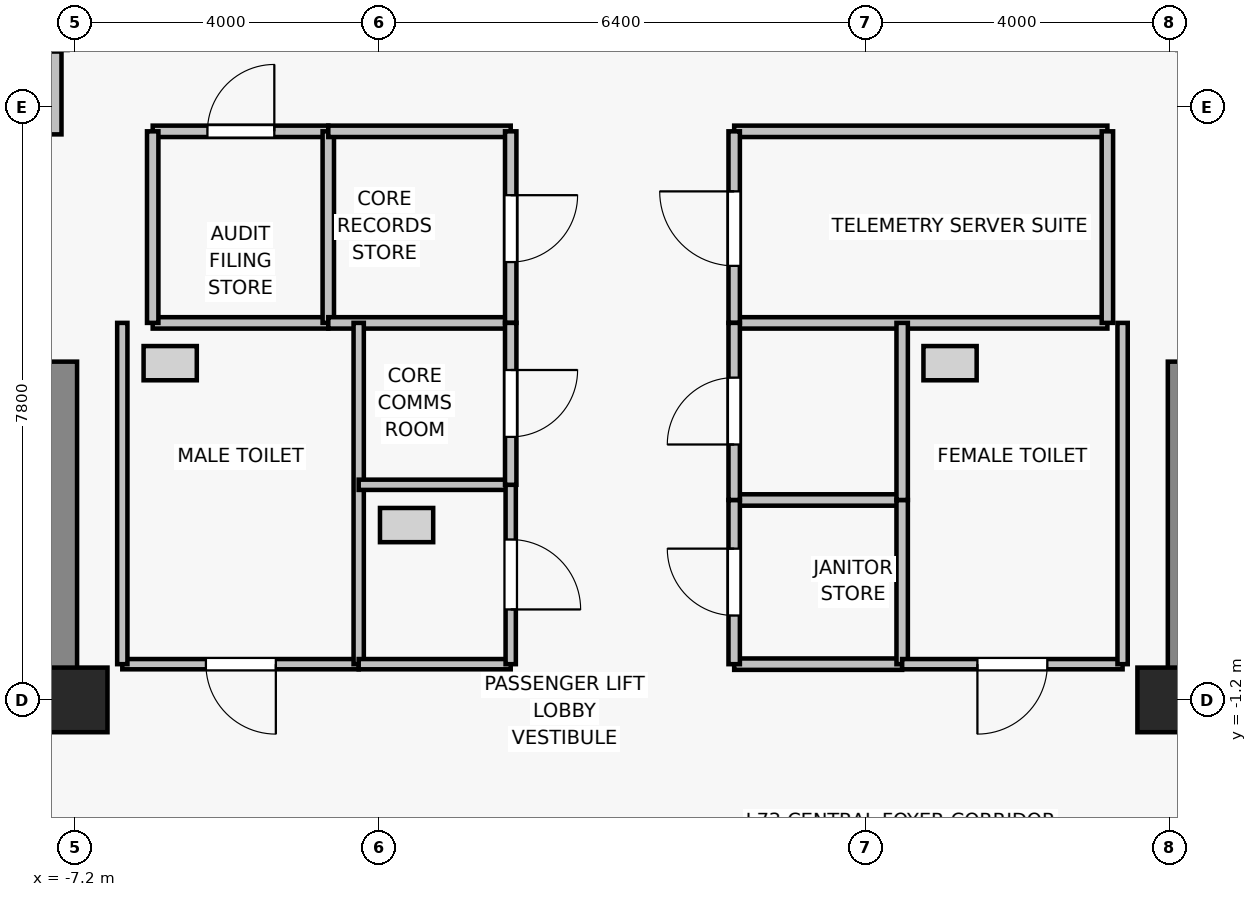
"""IFC4 building model, lengths in metres.
Left out: names, types, materials, properties, quantities, classifications, styles, units other than length and angle.
Written with IfcOpenShell. Run it as: python <this file> out.ifc"""

import sys

from ifc_helpers import new_model, si_unit, direction, frame, frame_2d, origin, origin_2d, place, context, subcontext, project, spatial, rectangle, extrude, source, transform, mapped, element, fill, save


model = new_model("IFC4")
c1 = context("Model", 3, precision=1e-05, world=origin(), true_north=direction((0.0, 1.0)))
c2 = subcontext(c1, "Body", "Model", "MODEL_VIEW")
j1 = project(units=[si_unit("LENGTHUNIT", "METRE"), si_unit("PLANEANGLEUNIT", "RADIAN")], contexts=[c1])
p1 = place(None, origin())
s1 = spatial("IfcSite", under=j1, at=p1, CompositionType="ELEMENT")
p2 = place(p1, origin())
s2 = spatial("IfcBuilding", under=s1, at=p2, CompositionType="ELEMENT")
p3 = place(p2, frame((0.0, 0.0, 258.4)))
s3 = spatial("IfcBuildingStorey", under=s2, at=p3, CompositionType="ELEMENT", Elevation=258.4)
for number, where, z_axis, x_axis in (
    (1, (-7.2, -1.2, 0.0), (0.0, 0.0, 1.0), (1.0, 0.0, 0.0)),
    (2, (7.2, -1.2, 0.0), (0.0, 0.0, 1.0), (1.0, 0.0, 0.0)),
):
    element("IfcColumn", number, at=place(p3, frame(where, z_axis=z_axis, x_axis=x_axis)), inside=s3, PredefinedType="COLUMN", context=c2, shape_type="SweptSolid", body=[
        extrude(rectangle(XDim=0.85, YDim=0.85, at=origin_2d()), origin(), (0.0, 0.0, 1.0), 3.3),
    ])
for number, where, z_axis, x_axis in (
    (3, (-7.4, -0.9, 0.0), (0.0, 0.0, 1.0), (0.0, 1.0, 0.0)),
    (4, (7.4, -0.9, 0.0), (0.0, 0.0, 1.0), (0.0, 1.0, 0.0)),
):
    element("IfcWall", number, at=place(p3, frame(where, z_axis=z_axis, x_axis=x_axis)), inside=s3, PredefinedType="SHEAR", context=c2, shape_type="SweptSolid", body=[
        extrude(rectangle(XDim=4.15, YDim=0.45, at=frame_2d((2.075, 0.0))), origin(), (0.0, 0.0, 1.0), 3.075),
    ])
p4 = place(p3, frame((-7.4, 7.35, 0.0), z_axis=(0.0, 0.0, 1.0), x_axis=(-1.0, 0.0, 0.0)))
e5 = element("IfcWall", 5, at=p4, inside=s3, PredefinedType="SOLIDWALL", context=c2, shape_type="SweptSolid", body=[
    extrude(rectangle(XDim=2.2, YDim=0.2, at=frame_2d((1.1, 0.0))), origin(), (0.0, 0.0, 1.0), 2.615),
])
p5 = place(p3, frame((-7.47, 7.33, 0.0), z_axis=(0.0, 0.0, 1.0), x_axis=(0.0, -1.0, 0.0)))
e6 = element("IfcWall", 6, at=p5, inside=s3, PredefinedType="PARTITIONING", context=c2, shape_type="SweptSolid", body=[
    extrude(rectangle(XDim=1.09, YDim=0.18, at=frame_2d((0.545, 0.0))), origin(), (0.0, 0.0, 1.0), 2.615),
])
p6 = place(p3, frame((-3.87, 3.76, 0.0), z_axis=(0.0, 0.0, 1.0), x_axis=(-1.0, 0.0, 0.0)))
e7 = element("IfcWall", 7, at=p6, inside=s3, PredefinedType="PARTITIONING", context=c2, shape_type="SweptSolid", body=[
    extrude(rectangle(XDim=2.31, YDim=0.15, at=frame_2d((1.155, 0.0))), origin(), (0.0, 0.0, 1.0), 3.075),
])
p7 = place(p3, frame((-6.18, 6.28, 0.0), z_axis=(0.0, 0.0, 1.0), x_axis=(1.0, 0.0, 0.0)))
e8 = element("IfcWall", 8, at=p7, inside=s3, PredefinedType="PARTITIONING", context=c2, shape_type="SweptSolid", body=[
    extrude(rectangle(XDim=2.31, YDim=0.15, at=frame_2d((1.155, 0.0))), origin(), (0.0, 0.0, 1.0), 3.075),
])
p8 = place(p7, frame((0.72, 0.0, 0.0)))
e9 = element("IfcOpeningElement", 9, at=p8, cuts=e8, PredefinedType="OPENING", context=c2, shape_type="SweptSolid", body=[
    extrude(rectangle(XDim=0.88, YDim=2.1, at=frame_2d((0.44, 1.05))), frame((0.0, 0.085, 0.0), z_axis=(0.0, -1.0, 0.0), x_axis=(1.0, 0.0, 0.0)), (0.0, 0.0, 1.0), 0.17),
])
for number, where, z_axis, x_axis in (
    (10, (-6.18, 3.76, 0.0), (0.0, 0.0, 1.0), (0.0, 1.0, 0.0)),
    (11, (-3.87, 6.28, 0.0), (0.0, 0.0, 1.0), (0.0, -1.0, 0.0)),
):
    element("IfcWall", number, at=place(p3, frame(where, z_axis=z_axis, x_axis=x_axis)), inside=s3, PredefinedType="PARTITIONING", context=c2, shape_type="SweptSolid", body=[
        extrude(rectangle(XDim=2.52, YDim=0.15, at=frame_2d((1.26, 0.0))), origin(), (0.0, 0.0, 1.0), 3.075),
    ])
for number, where, z_axis, x_axis in (
    (12, (-1.47, 3.76, 0.0), (0.0, 0.0, 1.0), (-1.0, 0.0, 0.0)),
    (13, (-3.87, 6.28, 0.0), (0.0, 0.0, 1.0), (1.0, 0.0, 0.0)),
):
    element("IfcWall", number, at=place(p3, frame(where, z_axis=z_axis, x_axis=x_axis)), inside=s3, PredefinedType="PARTITIONING", context=c2, shape_type="SweptSolid", body=[
        extrude(rectangle(XDim=2.4, YDim=0.15, at=frame_2d((1.2, 0.0))), origin(), (0.0, 0.0, 1.0), 3.075),
    ])
p9 = place(p3, frame((-1.47, 6.28, 0.0), z_axis=(0.0, 0.0, 1.0), x_axis=(0.0, -1.0, 0.0)))
e14 = element("IfcWall", 14, at=p9, inside=s3, PredefinedType="PARTITIONING", context=c2, shape_type="SweptSolid", body=[
    extrude(rectangle(XDim=2.52, YDim=0.15, at=frame_2d((1.26, 0.0))), origin(), (0.0, 0.0, 1.0), 3.075),
])
p10 = place(p9, frame((0.84, 0.0, 0.0)))
e15 = element("IfcOpeningElement", 15, at=p10, cuts=e14, PredefinedType="OPENING", context=c2, shape_type="SweptSolid", body=[
    extrude(rectangle(XDim=0.88, YDim=2.1, at=frame_2d((0.44, 1.05))), frame((0.0, 0.085, 0.0), z_axis=(0.0, -1.0, 0.0), x_axis=(1.0, 0.0, 0.0)), (0.0, 0.0, 1.0), 0.17),
])
for number, where, z_axis, x_axis in (
    (16, (6.38, 3.76, 0.0), (0.0, 0.0, 1.0), (-1.0, 0.0, 0.0)),
    (17, (1.47, 6.28, 0.0), (0.0, 0.0, 1.0), (1.0, 0.0, 0.0)),
):
    element("IfcWall", number, at=place(p3, frame(where, z_axis=z_axis, x_axis=x_axis)), inside=s3, PredefinedType="PARTITIONING", context=c2, shape_type="SweptSolid", body=[
        extrude(rectangle(XDim=4.91, YDim=0.15, at=frame_2d((2.455, 0.0))), origin(), (0.0, 0.0, 1.0), 3.075),
    ])
p11 = place(p3, frame((1.47, 3.76, 0.0), z_axis=(0.0, 0.0, 1.0), x_axis=(0.0, 1.0, 0.0)))
e18 = element("IfcWall", 18, at=p11, inside=s3, PredefinedType="PARTITIONING", context=c2, shape_type="SweptSolid", body=[
    extrude(rectangle(XDim=2.52, YDim=0.15, at=frame_2d((1.26, 0.0))), origin(), (0.0, 0.0, 1.0), 3.075),
])
p12 = place(p11, frame((0.75, 0.0, 0.0)))
e19 = element("IfcOpeningElement", 19, at=p12, cuts=e18, PredefinedType="OPENING", context=c2, shape_type="SweptSolid", body=[
    extrude(rectangle(XDim=0.98, YDim=2.15, at=frame_2d((0.49, 1.075))), frame((0.0, 0.085, 0.0), z_axis=(0.0, -1.0, 0.0), x_axis=(1.0, 0.0, 0.0)), (0.0, 0.0, 1.0), 0.17),
])
p13 = place(p3, frame((6.38, 6.28, 0.0), z_axis=(0.0, 0.0, 1.0), x_axis=(0.0, -1.0, 0.0)))
e20 = element("IfcWall", 20, at=p13, inside=s3, PredefinedType="PARTITIONING", context=c2, shape_type="SweptSolid", body=[
    extrude(rectangle(XDim=2.52, YDim=0.15, at=frame_2d((1.26, 0.0))), origin(), (0.0, 0.0, 1.0), 3.075),
])
p14 = place(p3, frame((-3.47, -0.73, 0.0), z_axis=(0.0, 0.0, 1.0), x_axis=(-1.0, 0.0, 0.0)))
e21 = element("IfcWall", 21, at=p14, inside=s3, PredefinedType="PARTITIONING", context=c2, shape_type="SweptSolid", body=[
    extrude(rectangle(XDim=3.11, YDim=0.135, at=frame_2d((1.555, 0.0))), origin(), (0.0, 0.0, 1.0), 3.075),
])
p15 = place(p14, frame((1.09, 0.0, 0.0)))
e22 = element("IfcOpeningElement", 22, at=p15, cuts=e21, PredefinedType="OPENING", context=c2, shape_type="SweptSolid", body=[
    extrude(rectangle(XDim=0.92, YDim=2.1, at=frame_2d((0.46, 1.05))), frame((0.0, 0.077, 0.0), z_axis=(0.0, -1.0, 0.0), x_axis=(1.0, 0.0, 0.0)), (0.0, 0.0, 1.0), 0.155),
])
for number, where, z_axis, x_axis in (
    (23, (-6.58, -0.73, 0.0), (0.0, 0.0, 1.0), (0.0, 1.0, 0.0)),
    (24, (-3.47, 3.76, 0.0), (0.0, 0.0, 1.0), (0.0, -1.0, 0.0)),
):
    element("IfcWall", number, at=place(p3, frame(where, z_axis=z_axis, x_axis=x_axis)), inside=s3, PredefinedType="PARTITIONING", context=c2, shape_type="SweptSolid", body=[
        extrude(rectangle(XDim=4.49, YDim=0.135, at=frame_2d((2.245, 0.0))), origin(), (0.0, 0.0, 1.0), 3.075),
    ])
for number, where, z_axis, x_axis in (
    (25, (-1.47, -0.73, 0.0), (0.0, 0.0, 1.0), (-1.0, 0.0, 0.0)),
    (26, (-3.47, 1.63, 0.0), (0.0, 0.0, 1.0), (1.0, 0.0, 0.0)),
):
    element("IfcWall", number, at=place(p3, frame(where, z_axis=z_axis, x_axis=x_axis)), inside=s3, PredefinedType="PARTITIONING", context=c2, shape_type="SweptSolid", body=[
        extrude(rectangle(XDim=2.0, YDim=0.135, at=frame_2d((1.0, 0.0))), origin(), (0.0, 0.0, 1.0), 3.075),
    ])
p16 = place(p3, frame((-1.47, 1.63, 0.0), z_axis=(0.0, 0.0, 1.0), x_axis=(0.0, -1.0, 0.0)))
e27 = element("IfcWall", 27, at=p16, inside=s3, PredefinedType="PARTITIONING", context=c2, shape_type="SweptSolid", body=[
    extrude(rectangle(XDim=2.36, YDim=0.135, at=frame_2d((1.18, 0.0))), origin(), (0.0, 0.0, 1.0), 3.075),
])
p17 = place(p16, frame((0.72, 0.0, 0.0)))
e28 = element("IfcOpeningElement", 28, at=p17, cuts=e27, PredefinedType="OPENING", context=c2, shape_type="SweptSolid", body=[
    extrude(rectangle(XDim=0.92, YDim=2.1, at=frame_2d((0.46, 1.05))), frame((0.0, 0.077, 0.0), z_axis=(0.0, -1.0, 0.0), x_axis=(1.0, 0.0, 0.0)), (0.0, 0.0, 1.0), 0.155),
])
p18 = place(p3, frame((-1.47, 3.76, 0.0), z_axis=(0.0, 0.0, 1.0), x_axis=(0.0, -1.0, 0.0)))
e29 = element("IfcWall", 29, at=p18, inside=s3, PredefinedType="PARTITIONING", context=c2, shape_type="SweptSolid", body=[
    extrude(rectangle(XDim=2.13, YDim=0.15, at=frame_2d((1.065, 0.0))), origin(), (0.0, 0.0, 1.0), 3.075),
])
p19 = place(p18, frame((0.62, 0.0, 0.0)))
e30 = element("IfcOpeningElement", 30, at=p19, cuts=e29, PredefinedType="OPENING", context=c2, shape_type="SweptSolid", body=[
    extrude(rectangle(XDim=0.88, YDim=2.1, at=frame_2d((0.44, 1.05))), frame((0.0, 0.085, 0.0), z_axis=(0.0, -1.0, 0.0), x_axis=(1.0, 0.0, 0.0)), (0.0, 0.0, 1.0), 0.17),
])
for number, where, z_axis, x_axis in (
    (31, (3.68, -0.73, 0.0), (0.0, 0.0, 1.0), (-1.0, 0.0, 0.0)),
    (32, (1.47, 1.43, 0.0), (0.0, 0.0, 1.0), (1.0, 0.0, 0.0)),
):
    element("IfcWall", number, at=place(p3, frame(where, z_axis=z_axis, x_axis=x_axis)), inside=s3, PredefinedType="PARTITIONING", context=c2, shape_type="SweptSolid", body=[
        extrude(rectangle(XDim=2.21, YDim=0.15, at=frame_2d((1.105, 0.0))), origin(), (0.0, 0.0, 1.0), 3.075),
    ])
p20 = place(p3, frame((1.47, -0.73, 0.0), z_axis=(0.0, 0.0, 1.0), x_axis=(0.0, 1.0, 0.0)))
e33 = element("IfcWall", 33, at=p20, inside=s3, PredefinedType="PARTITIONING", context=c2, shape_type="SweptSolid", body=[
    extrude(rectangle(XDim=2.16, YDim=0.15, at=frame_2d((1.08, 0.0))), origin(), (0.0, 0.0, 1.0), 3.075),
])
p21 = place(p20, frame((0.64, 0.0, 0.0)))
e34 = element("IfcOpeningElement", 34, at=p21, cuts=e33, PredefinedType="OPENING", context=c2, shape_type="SweptSolid", body=[
    extrude(rectangle(XDim=0.88, YDim=2.1, at=frame_2d((0.44, 1.05))), frame((0.0, 0.085, 0.0), z_axis=(0.0, -1.0, 0.0), x_axis=(1.0, 0.0, 0.0)), (0.0, 0.0, 1.0), 0.17),
])
p22 = place(p3, frame((3.68, 1.43, 0.0), z_axis=(0.0, 0.0, 1.0), x_axis=(0.0, -1.0, 0.0)))
e35 = element("IfcWall", 35, at=p22, inside=s3, PredefinedType="PARTITIONING", context=c2, shape_type="SweptSolid", body=[
    extrude(rectangle(XDim=2.16, YDim=0.15, at=frame_2d((1.08, 0.0))), origin(), (0.0, 0.0, 1.0), 3.075),
])
p23 = place(p3, frame((1.47, 1.43, 0.0), z_axis=(0.0, 0.0, 1.0), x_axis=(0.0, 1.0, 0.0)))
e36 = element("IfcWall", 36, at=p23, inside=s3, PredefinedType="PARTITIONING", context=c2, shape_type="SweptSolid", body=[
    extrude(rectangle(XDim=2.33, YDim=0.15, at=frame_2d((1.165, 0.0))), origin(), (0.0, 0.0, 1.0), 3.075),
])
p24 = place(p23, frame((0.73, 0.0, 0.0)))
e37 = element("IfcOpeningElement", 37, at=p24, cuts=e36, PredefinedType="OPENING", context=c2, shape_type="SweptSolid", body=[
    extrude(rectangle(XDim=0.88, YDim=2.15, at=frame_2d((0.44, 1.075))), frame((0.0, 0.085, 0.0), z_axis=(0.0, -1.0, 0.0), x_axis=(1.0, 0.0, 0.0)), (0.0, 0.0, 1.0), 0.17),
])
p25 = place(p3, frame((3.68, 3.76, 0.0), z_axis=(0.0, 0.0, 1.0), x_axis=(0.0, -1.0, 0.0)))
e38 = element("IfcWall", 38, at=p25, inside=s3, PredefinedType="PARTITIONING", context=c2, shape_type="SweptSolid", body=[
    extrude(rectangle(XDim=2.33, YDim=0.15, at=frame_2d((1.165, 0.0))), origin(), (0.0, 0.0, 1.0), 3.075),
])
p26 = place(p3, frame((6.58, -0.73, 0.0), z_axis=(0.0, 0.0, 1.0), x_axis=(-1.0, 0.0, 0.0)))
e39 = element("IfcWall", 39, at=p26, inside=s3, PredefinedType="PARTITIONING", context=c2, shape_type="SweptSolid", body=[
    extrude(rectangle(XDim=2.9, YDim=0.135, at=frame_2d((1.45, 0.0))), origin(), (0.0, 0.0, 1.0), 3.075),
])
p27 = place(p26, frame((0.99, 0.0, 0.0)))
e40 = element("IfcOpeningElement", 40, at=p27, cuts=e39, PredefinedType="OPENING", context=c2, shape_type="SweptSolid", body=[
    extrude(rectangle(XDim=0.92, YDim=2.1, at=frame_2d((0.46, 1.05))), frame((0.0, 0.077, 0.0), z_axis=(0.0, -1.0, 0.0), x_axis=(1.0, 0.0, 0.0)), (0.0, 0.0, 1.0), 0.155),
])
p28 = place(p3, frame((6.58, 3.76, 0.0), z_axis=(0.0, 0.0, 1.0), x_axis=(0.0, -1.0, 0.0)))
e41 = element("IfcWall", 41, at=p28, inside=s3, PredefinedType="PARTITIONING", context=c2, shape_type="SweptSolid", body=[
    extrude(rectangle(XDim=4.49, YDim=0.135, at=frame_2d((2.245, 0.0))), origin(), (0.0, 0.0, 1.0), 3.075),
])
m1 = source(origin(), c2, "Body", "SweptSolid", [
    extrude(rectangle(XDim=0.88, YDim=2.1, at=frame_2d((0.44, 1.05))), frame((0.0, 0.025, 0.0), z_axis=(0.0, -1.0, 0.0), x_axis=(1.0, 0.0, 0.0)), (0.0, 0.0, 1.0), 0.05),
])
p29 = place(p8, origin())
e42 = element("IfcDoor", 42, at=p29, inside=s3, OperationType="SINGLE_SWING_RIGHT", PredefinedType="DOOR", context=c2, shape_type="MappedRepresentation", body=[
    mapped(m1, transform((0.0, 0.0, 0.0), x_axis=(1.0, 0.0, 0.0), y_axis=(0.0, 1.0, 0.0), z_axis=(0.0, 0.0, 1.0), scale=1.0)),
])
fill(e9, e42)
p30 = place(p10, origin())
e43 = element("IfcDoor", 43, at=p30, inside=s3, OperationType="SINGLE_SWING_LEFT", PredefinedType="DOOR", context=c2, shape_type="MappedRepresentation", body=[
    mapped(m1, transform((0.0, 0.0, 0.0), x_axis=(1.0, 0.0, 0.0), y_axis=(0.0, 1.0, 0.0), z_axis=(0.0, 0.0, 1.0), scale=1.0)),
])
fill(e15, e43)
m2 = source(origin(), c2, "Body", "SweptSolid", [
    extrude(rectangle(XDim=0.98, YDim=2.15, at=frame_2d((0.49, 1.075))), frame((0.0, 0.025, 0.0), z_axis=(0.0, -1.0, 0.0), x_axis=(1.0, 0.0, 0.0)), (0.0, 0.0, 1.0), 0.05),
])
p31 = place(p12, origin())
e44 = element("IfcDoor", 44, at=p31, inside=s3, OperationType="SINGLE_SWING_RIGHT", PredefinedType="DOOR", context=c2, shape_type="MappedRepresentation", body=[
    mapped(m2, transform((0.0, 0.0, 0.0), x_axis=(1.0, 0.0, 0.0), y_axis=(0.0, 1.0, 0.0), z_axis=(0.0, 0.0, 1.0), scale=1.0)),
])
fill(e19, e44)
m3 = source(origin(), c2, "Body", "SweptSolid", [
    extrude(rectangle(XDim=0.92, YDim=2.1, at=frame_2d((0.46, 1.05))), frame((0.0, 0.025, 0.0), z_axis=(0.0, -1.0, 0.0), x_axis=(1.0, 0.0, 0.0)), (0.0, 0.0, 1.0), 0.05),
])
p32 = place(p15, origin())
e45 = element("IfcDoor", 45, at=p32, inside=s3, OperationType="SINGLE_SWING_LEFT", PredefinedType="DOOR", context=c2, shape_type="MappedRepresentation", body=[
    mapped(m3, transform((0.0, 0.0, 0.0), x_axis=(1.0, 0.0, 0.0), y_axis=(0.0, 1.0, 0.0), z_axis=(0.0, 0.0, 1.0), scale=1.0)),
])
fill(e22, e45)
p33 = place(p17, origin())
e46 = element("IfcDoor", 46, at=p33, inside=s3, OperationType="SINGLE_SWING_RIGHT", PredefinedType="DOOR", context=c2, shape_type="MappedRepresentation", body=[
    mapped(m3, transform((0.0, 0.0, 0.0), x_axis=(1.0, 0.0, 0.0), y_axis=(0.0, 1.0, 0.0), z_axis=(0.0, 0.0, 1.0), scale=1.0)),
])
fill(e28, e46)
p34 = place(p19, origin())
e47 = element("IfcDoor", 47, at=p34, inside=s3, OperationType="SINGLE_SWING_LEFT", PredefinedType="DOOR", context=c2, shape_type="MappedRepresentation", body=[
    mapped(m1, transform((0.0, 0.0, 0.0), x_axis=(1.0, 0.0, 0.0), y_axis=(0.0, 1.0, 0.0), z_axis=(0.0, 0.0, 1.0), scale=1.0)),
])
fill(e30, e47)
p35 = place(p21, origin())
e48 = element("IfcDoor", 48, at=p35, inside=s3, OperationType="SINGLE_SWING_RIGHT", PredefinedType="DOOR", context=c2, shape_type="MappedRepresentation", body=[
    mapped(m1, transform((0.0, 0.0, 0.0), x_axis=(1.0, 0.0, 0.0), y_axis=(0.0, 1.0, 0.0), z_axis=(0.0, 0.0, 1.0), scale=1.0)),
])
fill(e34, e48)
m4 = source(origin(), c2, "Body", "SweptSolid", [
    extrude(rectangle(XDim=0.88, YDim=2.15, at=frame_2d((0.44, 1.075))), frame((0.0, 0.025, 0.0), z_axis=(0.0, -1.0, 0.0), x_axis=(1.0, 0.0, 0.0)), (0.0, 0.0, 1.0), 0.05),
])
p36 = place(p24, origin())
e49 = element("IfcDoor", 49, at=p36, inside=s3, OperationType="SINGLE_SWING_LEFT", PredefinedType="DOOR", context=c2, shape_type="MappedRepresentation", body=[
    mapped(m4, transform((0.0, 0.0, 0.0), x_axis=(1.0, 0.0, 0.0), y_axis=(0.0, 1.0, 0.0), z_axis=(0.0, 0.0, 1.0), scale=1.0)),
])
fill(e37, e49)
p37 = place(p27, origin())
e50 = element("IfcDoor", 50, at=p37, inside=s3, OperationType="SINGLE_SWING_RIGHT", PredefinedType="DOOR", context=c2, shape_type="MappedRepresentation", body=[
    mapped(m3, transform((0.0, 0.0, 0.0), x_axis=(1.0, 0.0, 0.0), y_axis=(0.0, 1.0, 0.0), z_axis=(0.0, 0.0, 1.0), scale=1.0)),
])
fill(e40, e50)
save(model, sys.argv[1])
